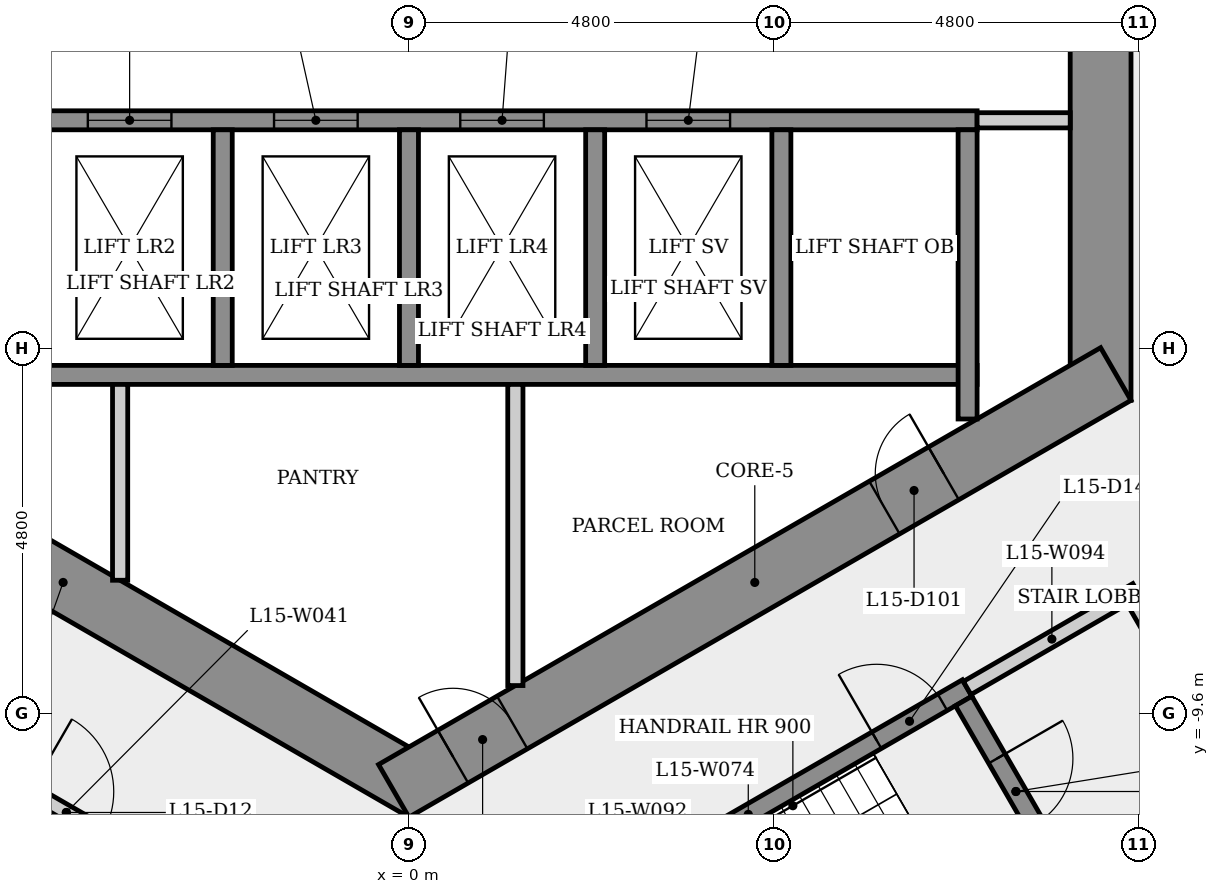
"""IFC4 building model, lengths in metres.
Left out: names, types, materials, properties, quantities, classifications, styles, units other than length and angle.
Written with IfcOpenShell. Run it as: python <this file> out.ifc"""

import sys

from ifc_helpers import new_model, si_unit, direction, frame, frame_2d, origin, place, context, subcontext, project, spatial, rectangle, extrude, element, fill, save


model = new_model("IFC4")
c1 = context("Model", 3, precision=1e-05, world=origin(), true_north=direction((0.0, 1.0)))
c2 = subcontext(c1, "Body", "Model", "MODEL_VIEW")
j1 = project(units=[si_unit("LENGTHUNIT", "METRE"), si_unit("PLANEANGLEUNIT", "RADIAN")], contexts=[c1])
p1 = place(None, origin())
s1 = spatial("IfcSite", under=j1, at=p1, CompositionType="ELEMENT")
p2 = place(p1, origin())
s2 = spatial("IfcBuilding", under=s1, at=p2, CompositionType="ELEMENT")
p3 = place(p2, frame((0.0, 0.0, 59.5)))
s3 = spatial("IfcBuildingStorey", under=s2, at=p3, CompositionType="ELEMENT", Elevation=59.5)
p4 = place(p3, frame((9.1, -5.485, 0.0), z_axis=(0.0, 0.0, 1.0), x_axis=(0.0, 1.0, 0.0)))
e1 = element("IfcWall", 1, at=p4, inside=s3, PredefinedType="SHEAR", context=c2, shape_type="SweptSolid", body=[
    extrude(rectangle(XDim=10.97, YDim=0.8, at=frame_2d((5.485, 0.0))), origin(), (0.0, 0.0, 1.0), 3.4),
])
p5 = place(p4, frame((4.685, 0.0, 0.0)))
e2 = element("IfcOpeningElement", 2, at=p5, cuts=e1, PredefinedType="OPENING", context=c2, shape_type="SweptSolid", body=[
    extrude(rectangle(XDim=1.6, YDim=2.1, at=frame_2d((0.8, 1.05))), frame((0.0, 0.41, 0.0), z_axis=(0.0, -1.0, 0.0), x_axis=(1.0, 0.0, 0.0)), (0.0, 0.0, 1.0), 0.82),
])
p6 = place(p3, frame((-9.3, -5.138, 0.0), z_axis=(0.0, 0.0, 1.0), x_axis=(0.866023993627, -0.500002442456, 0.0)))
e3 = element("IfcWall", 3, at=p6, inside=s3, PredefinedType="SHEAR", context=c2, shape_type="SweptSolid", body=[
    extrude(rectangle(XDim=10.97, YDim=0.8, at=frame_2d((5.485, 0.0))), origin(), (0.0, 0.0, 1.0), 3.4),
])
p7 = place(p6, frame((0.78, 0.0, 0.0)))
e4 = element("IfcOpeningElement", 4, at=p7, cuts=e3, PredefinedType="OPENING", context=c2, shape_type="SweptSolid", body=[
    extrude(rectangle(XDim=0.9, YDim=2.1, at=frame_2d((0.45, 1.05))), frame((0.0, 0.41, 0.0), z_axis=(0.0, -1.0, 0.0), x_axis=(1.0, 0.0, 0.0)), (0.0, 0.0, 1.0), 0.82),
])
p8 = place(p3, frame((-0.2, -10.623, 0.0), z_axis=(0.0, 0.0, 1.0), x_axis=(0.866023993627, 0.500002442456, 0.0)))
e5 = element("IfcWall", 5, at=p8, inside=s3, PredefinedType="SHEAR", context=c2, shape_type="SweptSolid", body=[
    extrude(rectangle(XDim=10.97, YDim=0.8, at=frame_2d((5.485, 0.0))), origin(), (0.0, 0.0, 1.0), 3.4),
])
p9 = place(p8, frame((0.9, 0.0, 0.0)))
e6 = element("IfcOpeningElement", 6, at=p9, cuts=e5, PredefinedType="OPENING", context=c2, shape_type="SweptSolid", body=[
    extrude(rectangle(XDim=0.9, YDim=2.1, at=frame_2d((0.45, 1.05))), frame((0.0, 0.41, 0.0), z_axis=(0.0, -1.0, 0.0), x_axis=(1.0, 0.0, 0.0)), (0.0, 0.0, 1.0), 0.82),
])
p10 = place(p8, frame((7.455, 0.0, 0.0)))
e7 = element("IfcOpeningElement", 7, at=p10, cuts=e5, PredefinedType="OPENING", context=c2, shape_type="SweptSolid", body=[
    extrude(rectangle(XDim=0.9, YDim=2.1, at=frame_2d((0.45, 1.05))), frame((0.0, 0.41, 0.0), z_axis=(0.0, -1.0, 0.0), x_axis=(1.0, 0.0, 0.0)), (0.0, 0.0, 1.0), 0.82),
])
p11 = place(p3, frame((-6.435, -9.795, 0.0), z_axis=(0.0, 0.0, 1.0), x_axis=(0.866012907634, -0.500021643343, 0.0)))
e8 = element("IfcWall", 8, at=p11, inside=s3, PredefinedType="PARTITIONING", context=c2, shape_type="SweptSolid", body=[
    extrude(rectangle(XDim=4.45, YDim=0.2, at=frame_2d((2.225, 0.0))), origin(), (0.0, 0.0, 1.0), 3.05),
])
p12 = place(p11, frame((1.675, 0.0, 0.0)))
e9 = element("IfcOpeningElement", 9, at=p12, cuts=e8, PredefinedType="OPENING", context=c2, shape_type="SweptSolid", body=[
    extrude(rectangle(XDim=1.1, YDim=2.1, at=frame_2d((0.55, 1.05))), frame((0.0, 0.11, 0.0), z_axis=(0.0, -1.0, 0.0), x_axis=(1.0, 0.0, 0.0)), (0.0, 0.0, 1.0), 0.22),
])
p13 = place(p3, frame((-7.225, -5.15, 0.0), z_axis=(0.0, 0.0, 1.0), x_axis=(1.0, 0.0, 0.0)))
e10 = element("IfcWall", 10, at=p13, inside=s3, PredefinedType="SHEAR", context=c2, shape_type="SweptSolid", body=[
    extrude(rectangle(XDim=14.7, YDim=0.25, at=frame_2d((7.35, 0.0))), origin(), (0.0, 0.0, 1.0), 3.05),
])
p14 = place(p3, frame((-7.225, -1.8, 0.0), z_axis=(0.0, 0.0, 1.0), x_axis=(1.0, 0.0, 0.0)))
e11 = element("IfcWall", 11, at=p14, inside=s3, PredefinedType="SHEAR", context=c2, shape_type="SweptSolid", body=[
    extrude(rectangle(XDim=14.7, YDim=0.25, at=frame_2d((7.35, 0.0))), origin(), (0.0, 0.0, 1.0), 3.05),
])
p15 = place(p14, frame((0.597, 0.0, 0.0)))
e12 = element("IfcOpeningElement", 12, at=p15, cuts=e11, PredefinedType="OPENING", context=c2, shape_type="SweptSolid", body=[
    extrude(rectangle(XDim=1.1, YDim=2.1, at=frame_2d((0.55, 1.05))), frame((0.0, 0.135, 0.0), z_axis=(0.0, -1.0, 0.0), x_axis=(1.0, 0.0, 0.0)), (0.0, 0.0, 1.0), 0.27),
])
p16 = place(p14, frame((3.0, 0.0, 0.0)))
e13 = element("IfcOpeningElement", 13, at=p16, cuts=e11, PredefinedType="OPENING", context=c2, shape_type="SweptSolid", body=[
    extrude(rectangle(XDim=1.1, YDim=2.1, at=frame_2d((0.55, 1.05))), frame((0.0, 0.135, 0.0), z_axis=(0.0, -1.0, 0.0), x_axis=(1.0, 0.0, 0.0)), (0.0, 0.0, 1.0), 0.27),
])
p17 = place(p14, frame((5.45, 0.0, 0.0)))
e14 = element("IfcOpeningElement", 14, at=p17, cuts=e11, PredefinedType="OPENING", context=c2, shape_type="SweptSolid", body=[
    extrude(rectangle(XDim=1.1, YDim=2.1, at=frame_2d((0.55, 1.05))), frame((0.0, 0.135, 0.0), z_axis=(0.0, -1.0, 0.0), x_axis=(1.0, 0.0, 0.0)), (0.0, 0.0, 1.0), 0.27),
])
p18 = place(p14, frame((7.9, 0.0, 0.0)))
e15 = element("IfcOpeningElement", 15, at=p18, cuts=e11, PredefinedType="OPENING", context=c2, shape_type="SweptSolid", body=[
    extrude(rectangle(XDim=1.1, YDim=2.1, at=frame_2d((0.55, 1.05))), frame((0.0, 0.135, 0.0), z_axis=(0.0, -1.0, 0.0), x_axis=(1.0, 0.0, 0.0)), (0.0, 0.0, 1.0), 0.27),
])
p19 = place(p14, frame((10.35, 0.0, 0.0)))
e16 = element("IfcOpeningElement", 16, at=p19, cuts=e11, PredefinedType="OPENING", context=c2, shape_type="SweptSolid", body=[
    extrude(rectangle(XDim=1.1, YDim=2.1, at=frame_2d((0.55, 1.05))), frame((0.0, 0.135, 0.0), z_axis=(0.0, -1.0, 0.0), x_axis=(1.0, 0.0, 0.0)), (0.0, 0.0, 1.0), 0.27),
])
p20 = place(p3, frame((-3.8, -5.275, 0.0), z_axis=(0.0, 0.0, 1.0), x_axis=(0.0, -1.0, 0.0)))
e17 = element("IfcWall", 17, at=p20, inside=s3, PredefinedType="PARTITIONING", context=c2, shape_type="SweptSolid", body=[
    extrude(rectangle(XDim=2.577, YDim=0.2, at=frame_2d((1.289, 0.0))), origin(), (0.0, 0.0, 1.0), 3.05),
])
for number, where, z_axis, x_axis in (
    (18, (-2.45, -1.925, 0.0), (0.0, 0.0, 1.0), (0.0, -1.0, 0.0)),
    (19, (0.0, -1.925, 0.0), (0.0, 0.0, 1.0), (0.0, -1.0, 0.0)),
):
    element("IfcWall", number, at=place(p3, frame(where, z_axis=z_axis, x_axis=x_axis)), inside=s3, PredefinedType="SHEAR", context=c2, shape_type="SweptSolid", body=[
        extrude(rectangle(XDim=3.1, YDim=0.25, at=frame_2d((1.55, 0.0))), origin(), (0.0, 0.0, 1.0), 3.4),
    ])
p21 = place(p3, frame((1.4, -5.275, 0.0), z_axis=(0.0, 0.0, 1.0), x_axis=(0.0, -1.0, 0.0)))
e20 = element("IfcWall", 20, at=p21, inside=s3, PredefinedType="PARTITIONING", context=c2, shape_type="SweptSolid", body=[
    extrude(rectangle(XDim=3.963, YDim=0.2, at=frame_2d((1.981, 0.0))), origin(), (0.0, 0.0, 1.0), 3.05),
])
p22 = place(p3, frame((1.585, -12.595, 0.0), z_axis=(0.0, 0.0, 1.0), x_axis=(0.866036417653, 0.499980922934, 0.0)))
e21 = element("IfcWall", 21, at=p22, inside=s3, PredefinedType="SHEAR", context=c2, shape_type="SweptSolid", body=[
    extrude(rectangle(XDim=6.65, YDim=0.25, at=frame_2d((3.325, 0.0))), origin(), (0.0, 0.0, 1.0), 3.05),
])
p23 = place(p22, frame((5.275, 0.0, 0.0)))
e22 = element("IfcOpeningElement", 22, at=p23, cuts=e21, PredefinedType="OPENING", context=c2, shape_type="SweptSolid", body=[
    extrude(rectangle(XDim=1.0, YDim=2.1, at=frame_2d((0.5, 1.05))), frame((0.0, 0.135, 0.0), z_axis=(0.0, -1.0, 0.0), x_axis=(1.0, 0.0, 0.0)), (0.0, 0.0, 1.0), 0.27),
])
for number, where, z_axis, x_axis in (
    (23, (2.45, -1.925, 0.0), (0.0, 0.0, 1.0), (0.0, -1.0, 0.0)),
    (24, (4.9, -1.925, 0.0), (0.0, 0.0, 1.0), (0.0, -1.0, 0.0)),
):
    element("IfcWall", number, at=place(p3, frame(where, z_axis=z_axis, x_axis=x_axis)), inside=s3, PredefinedType="SHEAR", context=c2, shape_type="SweptSolid", body=[
        extrude(rectangle(XDim=3.1, YDim=0.25, at=frame_2d((1.55, 0.0))), origin(), (0.0, 0.0, 1.0), 3.4),
    ])
p24 = place(p3, frame((7.298, -9.441, 0.0), z_axis=(0.0, 0.0, 1.0), x_axis=(0.500034990121, -0.866005201286, 0.0)))
e25 = element("IfcWall", 25, at=p24, inside=s3, PredefinedType="SHEAR", context=c2, shape_type="SweptSolid", body=[
    extrude(rectangle(XDim=2.75, YDim=0.25, at=frame_2d((1.375, 0.0))), origin(), (0.0, 0.0, 1.0), 3.05),
])
p25 = place(p24, frame((0.875, 0.0, 0.0)))
e26 = element("IfcOpeningElement", 26, at=p25, cuts=e25, PredefinedType="OPENING", context=c2, shape_type="SweptSolid", body=[
    extrude(rectangle(XDim=1.0, YDim=2.1, at=frame_2d((0.5, 1.05))), frame((0.0, 0.135, 0.0), z_axis=(0.0, -1.0, 0.0), x_axis=(1.0, 0.0, 0.0)), (0.0, 0.0, 1.0), 0.27),
])
p26 = place(p3, frame((7.344, -9.27, 0.0), z_axis=(0.0, 0.0, 1.0), x_axis=(0.866005588531, 0.500034319456, 0.0)))
e27 = element("IfcWall", 27, at=p26, inside=s3, PredefinedType="PARTITIONING", context=c2, shape_type="SweptSolid", body=[
    extrude(rectangle(XDim=2.575, YDim=0.2, at=frame_2d((1.288, 0.0))), origin(), (0.0, 0.0, 1.0), 3.05),
])
p27 = place(p3, frame((7.35, -1.925, 0.0), z_axis=(0.0, 0.0, 1.0), x_axis=(0.0, -1.0, 0.0)))
e28 = element("IfcWall", 28, at=p27, inside=s3, PredefinedType="SHEAR", context=c2, shape_type="SweptSolid", body=[
    extrude(rectangle(XDim=3.805, YDim=0.25, at=frame_2d((1.903, 0.0))), origin(), (0.0, 0.0, 1.0), 3.05),
])
p28 = place(p3, frame((8.7, -1.8, 0.0), z_axis=(0.0, 0.0, 1.0), x_axis=(-1.0, 0.0, 0.0)))
e29 = element("IfcWall", 29, at=p28, inside=s3, PredefinedType="PARTITIONING", context=c2, shape_type="SweptSolid", body=[
    extrude(rectangle(XDim=1.225, YDim=0.2, at=frame_2d((0.613, 0.0))), origin(), (0.0, 0.0, 1.0), 3.05),
])
p29 = place(p3, frame((9.537, -8.119, 0.0), z_axis=(0.0, 0.0, 1.0), x_axis=(0.499990139034, -0.866031096941, 0.0)))
e30 = element("IfcWall", 30, at=p29, inside=s3, PredefinedType="PARTITIONING", context=c2, shape_type="SweptSolid", body=[
    extrude(rectangle(XDim=3.0, YDim=0.2, at=frame_2d((1.5, 0.0))), origin(), (0.0, 0.0, 1.0), 3.05),
])
p30 = place(p29, frame((0.935, 0.0, 0.0)))
e31 = element("IfcOpeningElement", 31, at=p30, cuts=e30, PredefinedType="OPENING", context=c2, shape_type="SweptSolid", body=[
    extrude(rectangle(XDim=1.0, YDim=2.1, at=frame_2d((0.5, 1.05))), frame((0.0, 0.11, 0.0), z_axis=(0.0, -1.0, 0.0), x_axis=(1.0, 0.0, 0.0)), (0.0, 0.0, 1.0), 0.22),
])
p31 = place(p3, frame((10.901, -10.681, 0.0), z_axis=(0.0, 0.0, 1.0), x_axis=(-0.866009402589, -0.500027713859, 0.0)))
e32 = element("IfcWall", 32, at=p31, inside=s3, PredefinedType="PARTITIONING", context=c2, shape_type="SweptSolid", body=[
    extrude(rectangle(XDim=2.1, YDim=0.2, at=frame_2d((1.05, 0.0))), origin(), (0.0, 0.0, 1.0), 3.05),
])
p32 = place(p16, origin())
e33 = element("IfcDoor", 33, at=p32, inside=s3, OperationType="SLIDING_TO_LEFT", PredefinedType="DOOR", context=c2, shape_type="SweptSolid", body=[
    extrude(rectangle(XDim=1.1, YDim=2.1, at=frame_2d((0.55, 1.05))), frame((0.0, 0.025, 0.0), z_axis=(0.0, -1.0, 0.0), x_axis=(1.0, 0.0, 0.0)), (0.0, 0.0, 1.0), 0.05),
])
fill(e13, e33)
p33 = place(p17, origin())
e34 = element("IfcDoor", 34, at=p33, inside=s3, OperationType="SLIDING_TO_LEFT", PredefinedType="DOOR", context=c2, shape_type="SweptSolid", body=[
    extrude(rectangle(XDim=1.1, YDim=2.1, at=frame_2d((0.55, 1.05))), frame((0.0, 0.025, 0.0), z_axis=(0.0, -1.0, 0.0), x_axis=(1.0, 0.0, 0.0)), (0.0, 0.0, 1.0), 0.05),
])
fill(e14, e34)
p34 = place(p18, origin())
e35 = element("IfcDoor", 35, at=p34, inside=s3, OperationType="SLIDING_TO_LEFT", PredefinedType="DOOR", context=c2, shape_type="SweptSolid", body=[
    extrude(rectangle(XDim=1.1, YDim=2.1, at=frame_2d((0.55, 1.05))), frame((0.0, 0.025, 0.0), z_axis=(0.0, -1.0, 0.0), x_axis=(1.0, 0.0, 0.0)), (0.0, 0.0, 1.0), 0.05),
])
fill(e15, e35)
p35 = place(p19, origin())
e36 = element("IfcDoor", 36, at=p35, inside=s3, OperationType="SLIDING_TO_LEFT", PredefinedType="DOOR", context=c2, shape_type="SweptSolid", body=[
    extrude(rectangle(XDim=1.1, YDim=2.1, at=frame_2d((0.55, 1.05))), frame((0.0, 0.025, 0.0), z_axis=(0.0, -1.0, 0.0), x_axis=(1.0, 0.0, 0.0)), (0.0, 0.0, 1.0), 0.05),
])
fill(e16, e36)
p36 = place(p12, origin())
e37 = element("IfcDoor", 37, at=p36, inside=s3, OperationType="SINGLE_SWING_LEFT", PredefinedType="DOOR", context=c2, shape_type="SweptSolid", body=[
    extrude(rectangle(XDim=1.1, YDim=2.1, at=frame_2d((0.55, 1.05))), frame((0.0, 0.025, 0.0), z_axis=(0.0, -1.0, 0.0), x_axis=(1.0, 0.0, 0.0)), (0.0, 0.0, 1.0), 0.05),
])
fill(e9, e37)
p37 = place(p23, origin())
e38 = element("IfcDoor", 38, at=p37, inside=s3, OperationType="SINGLE_SWING_LEFT", PredefinedType="DOOR", context=c2, shape_type="SweptSolid", body=[
    extrude(rectangle(XDim=1.0, YDim=2.1, at=frame_2d((0.5, 1.05))), frame((0.0, 0.025, 0.0), z_axis=(0.0, -1.0, 0.0), x_axis=(1.0, 0.0, 0.0)), (0.0, 0.0, 1.0), 0.05),
])
fill(e22, e38)
p38 = place(p25, origin())
e39 = element("IfcDoor", 39, at=p38, inside=s3, OperationType="SINGLE_SWING_LEFT", PredefinedType="DOOR", context=c2, shape_type="SweptSolid", body=[
    extrude(rectangle(XDim=1.0, YDim=2.1, at=frame_2d((0.5, 1.05))), frame((0.0, 0.025, 0.0), z_axis=(0.0, -1.0, 0.0), x_axis=(1.0, 0.0, 0.0)), (0.0, 0.0, 1.0), 0.05),
])
fill(e26, e39)
p39 = place(p9, origin())
e40 = element("IfcDoor", 40, at=p39, inside=s3, OperationType="SINGLE_SWING_LEFT", PredefinedType="DOOR", context=c2, shape_type="SweptSolid", body=[
    extrude(rectangle(XDim=0.9, YDim=2.1, at=frame_2d((0.45, 1.05))), frame((0.0, 0.025, 0.0), z_axis=(0.0, -1.0, 0.0), x_axis=(1.0, 0.0, 0.0)), (0.0, 0.0, 1.0), 0.05),
])
fill(e6, e40)
p40 = place(p10, origin())
e41 = element("IfcDoor", 41, at=p40, inside=s3, OperationType="SINGLE_SWING_RIGHT", PredefinedType="DOOR", context=c2, shape_type="SweptSolid", body=[
    extrude(rectangle(XDim=0.9, YDim=2.1, at=frame_2d((0.45, 1.05))), frame((0.0, 0.025, 0.0), z_axis=(0.0, -1.0, 0.0), x_axis=(1.0, 0.0, 0.0)), (0.0, 0.0, 1.0), 0.05),
])
fill(e7, e41)
save(model, sys.argv[1])
